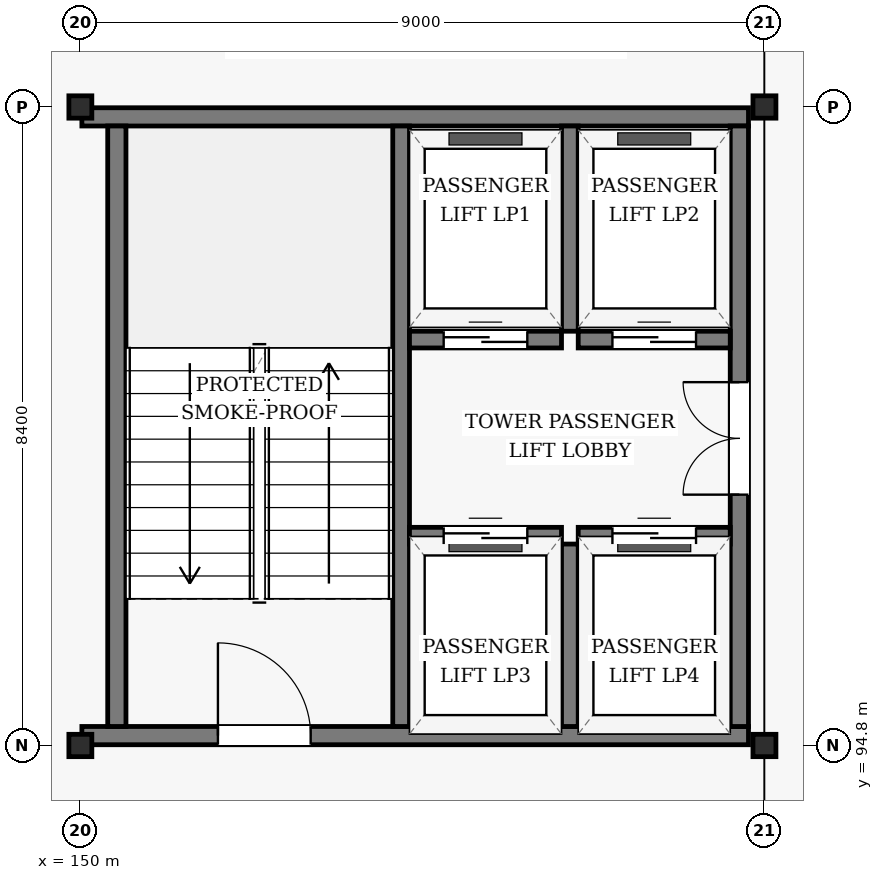
"""IFC4 building model, lengths in metres.
Left out: names, types, materials, properties, quantities, classifications, styles, units other than length and angle.
Written with IfcOpenShell. Run it as: python <this file> out.ifc"""

import sys

from ifc_helpers import new_model, si_unit, direction, frame, frame_2d, origin, origin_2d, place, context, subcontext, project, spatial, rectangle, i_section, extrude, element, fill, save


model = new_model("IFC4")
c1 = context("Model", 3, precision=1e-05, world=origin(), true_north=direction((0.0, 1.0)))
c2 = subcontext(c1, "Body", "Model", "MODEL_VIEW")
j1 = project(units=[si_unit("LENGTHUNIT", "METRE"), si_unit("PLANEANGLEUNIT", "RADIAN")], contexts=[c1])
p1 = place(None, origin())
s1 = spatial("IfcSite", under=j1, at=p1, CompositionType="ELEMENT")
p2 = place(p1, origin())
s2 = spatial("IfcBuilding", under=s1, at=p2, CompositionType="ELEMENT")
p3 = place(p2, frame((0.0, 0.0, 57.6)))
s3 = spatial("IfcBuildingStorey", under=s2, at=p3, CompositionType="ELEMENT", Elevation=57.6)
for number, where, z_axis, x_axis in (
    (1, (150.0, 94.8, 0.0), (0.0, 0.0, 1.0), (1.0, 0.0, 0.0)),
    (2, (150.0, 103.2, 0.0), (0.0, 0.0, 1.0), (1.0, 0.0, 0.0)),
    (3, (159.0, 94.8, 0.0), (0.0, 0.0, 1.0), (1.0, 0.0, 0.0)),
    (4, (159.0, 103.2, 0.0), (0.0, 0.0, 1.0), (1.0, 0.0, 0.0)),
):
    element("IfcColumn", number, at=place(p3, frame(where, z_axis=z_axis, x_axis=x_axis)), inside=s3, PredefinedType="COLUMN", context=c2, shape_type="SweptSolid", body=[
        extrude(i_section(OverallWidth=0.302, OverallDepth=0.294, WebThickness=0.012, FlangeThickness=0.012, FilletRadius=0.018, at=origin_2d()), origin(), (0.0, 0.0, 1.0), 3.6),
    ])
p4 = place(p3, frame((150.02, 94.93, 0.0), z_axis=(0.0, 0.0, 1.0), x_axis=(1.0, 0.0, 0.0)))
e5 = element("IfcWall", 5, at=p4, inside=s3, PredefinedType="SHEAR", context=c2, shape_type="SweptSolid", body=[
    extrude(rectangle(XDim=8.77, YDim=0.24, at=frame_2d((4.385, 0.0))), origin(), (0.0, 0.0, 1.0), 3.33),
])
p5 = place(p4, frame((1.79, 0.0, 0.0)))
e6 = element("IfcOpeningElement", 6, at=p5, cuts=e5, PredefinedType="OPENING", context=c2, shape_type="SweptSolid", body=[
    extrude(rectangle(XDim=1.22, YDim=2.18, at=frame_2d((0.61, 1.09))), frame((0.0, 0.13, 0.0), z_axis=(0.0, -1.0, 0.0), x_axis=(1.0, 0.0, 0.0)), (0.0, 0.0, 1.0), 0.26),
])
p6 = place(p3, frame((150.02, 103.07, 0.0), z_axis=(0.0, 0.0, 1.0), x_axis=(1.0, 0.0, 0.0)))
e7 = element("IfcWall", 7, at=p6, inside=s3, PredefinedType="SHEAR", context=c2, shape_type="SweptSolid", body=[
    extrude(rectangle(XDim=8.77, YDim=0.24, at=frame_2d((4.385, 0.0))), origin(), (0.0, 0.0, 1.0), 3.33),
])
p7 = place(p3, frame((150.48, 95.05, 0.0), z_axis=(0.0, 0.0, 1.0), x_axis=(0.0, 1.0, 0.0)))
e8 = element("IfcWall", 8, at=p7, inside=s3, PredefinedType="SHEAR", context=c2, shape_type="SweptSolid", body=[
    extrude(rectangle(XDim=7.9, YDim=0.24, at=frame_2d((3.95, 0.0))), origin(), (0.0, 0.0, 1.0), 3.33),
])
p8 = place(p3, frame((154.22, 95.05, 0.0), z_axis=(0.0, 0.0, 1.0), x_axis=(0.0, 1.0, 0.0)))
e9 = element("IfcWall", 9, at=p8, inside=s3, PredefinedType="SHEAR", context=c2, shape_type="SweptSolid", body=[
    extrude(rectangle(XDim=7.9, YDim=0.22, at=frame_2d((3.95, 0.0))), origin(), (0.0, 0.0, 1.0), 3.33),
])
p9 = place(p3, frame((158.67, 95.05, 0.0), z_axis=(0.0, 0.0, 1.0), x_axis=(0.0, 1.0, 0.0)))
e10 = element("IfcWall", 10, at=p9, inside=s3, PredefinedType="SHEAR", context=c2, shape_type="SweptSolid", body=[
    extrude(rectangle(XDim=7.9, YDim=0.24, at=frame_2d((3.95, 0.0))), origin(), (0.0, 0.0, 1.0), 3.33),
])
p10 = place(p9, frame((3.05, 0.0, 0.0)))
e11 = element("IfcOpeningElement", 11, at=p10, cuts=e10, PredefinedType="OPENING", context=c2, shape_type="SweptSolid", body=[
    extrude(rectangle(XDim=1.48, YDim=2.22, at=frame_2d((0.74, 1.11))), frame((0.0, 0.13, 0.0), z_axis=(0.0, -1.0, 0.0), x_axis=(1.0, 0.0, 0.0)), (0.0, 0.0, 1.0), 0.26),
])
p11 = place(p3, frame((156.44, 100.25, 0.0), z_axis=(0.0, 0.0, 1.0), x_axis=(0.0, 1.0, 0.0)))
e12 = element("IfcWall", 12, at=p11, inside=s3, PredefinedType="SHEAR", context=c2, shape_type="SweptSolid", body=[
    extrude(rectangle(XDim=2.7, YDim=0.22, at=frame_2d((1.35, 0.0))), origin(), (0.0, 0.0, 1.0), 3.33),
])
p12 = place(p3, frame((154.33, 100.14, 0.0), z_axis=(0.0, 0.0, 1.0), x_axis=(1.0, 0.0, 0.0)))
e13 = element("IfcWall", 13, at=p12, inside=s3, PredefinedType="SHEAR", context=c2, shape_type="SweptSolid", body=[
    extrude(rectangle(XDim=2.0, YDim=0.22, at=frame_2d((1.0, 0.0))), origin(), (0.0, 0.0, 1.0), 3.33),
])
p13 = place(p12, frame((0.45, 0.0, 0.0)))
e14 = element("IfcOpeningElement", 14, at=p13, cuts=e13, PredefinedType="OPENING", context=c2, shape_type="SweptSolid", body=[
    extrude(rectangle(XDim=1.1, YDim=2.15, at=frame_2d((0.55, 1.075))), frame((0.0, 0.12, 0.0), z_axis=(0.0, -1.0, 0.0), x_axis=(1.0, 0.0, 0.0)), (0.0, 0.0, 1.0), 0.24),
])
p14 = place(p3, frame((156.55, 100.14, 0.0), z_axis=(0.0, 0.0, 1.0), x_axis=(1.0, 0.0, 0.0)))
e15 = element("IfcWall", 15, at=p14, inside=s3, PredefinedType="SHEAR", context=c2, shape_type="SweptSolid", body=[
    extrude(rectangle(XDim=2.0, YDim=0.22, at=frame_2d((1.0, 0.0))), origin(), (0.0, 0.0, 1.0), 3.33),
])
p15 = place(p14, frame((0.45, 0.0, 0.0)))
e16 = element("IfcOpeningElement", 16, at=p15, cuts=e15, PredefinedType="OPENING", context=c2, shape_type="SweptSolid", body=[
    extrude(rectangle(XDim=1.1, YDim=2.15, at=frame_2d((0.55, 1.075))), frame((0.0, 0.12, 0.0), z_axis=(0.0, -1.0, 0.0), x_axis=(1.0, 0.0, 0.0)), (0.0, 0.0, 1.0), 0.24),
])
p16 = place(p3, frame((156.44, 95.05, 0.0), z_axis=(0.0, 0.0, 1.0), x_axis=(0.0, 1.0, 0.0)))
e17 = element("IfcWall", 17, at=p16, inside=s3, PredefinedType="SHEAR", context=c2, shape_type="SweptSolid", body=[
    extrude(rectangle(XDim=2.4, YDim=0.22, at=frame_2d((1.2, 0.0))), origin(), (0.0, 0.0, 1.0), 3.33),
])
p17 = place(p3, frame((154.33, 97.56, 0.0), z_axis=(0.0, 0.0, 1.0), x_axis=(1.0, 0.0, 0.0)))
e18 = element("IfcWall", 18, at=p17, inside=s3, PredefinedType="SHEAR", context=c2, shape_type="SweptSolid", body=[
    extrude(rectangle(XDim=2.0, YDim=0.22, at=frame_2d((1.0, 0.0))), origin(), (0.0, 0.0, 1.0), 3.33),
])
p18 = place(p17, frame((0.45, 0.0, 0.0)))
e19 = element("IfcOpeningElement", 19, at=p18, cuts=e18, PredefinedType="OPENING", context=c2, shape_type="SweptSolid", body=[
    extrude(rectangle(XDim=1.1, YDim=2.15, at=frame_2d((0.55, 1.075))), frame((0.0, 0.12, 0.0), z_axis=(0.0, -1.0, 0.0), x_axis=(1.0, 0.0, 0.0)), (0.0, 0.0, 1.0), 0.24),
])
p19 = place(p3, frame((156.55, 97.56, 0.0), z_axis=(0.0, 0.0, 1.0), x_axis=(1.0, 0.0, 0.0)))
e20 = element("IfcWall", 20, at=p19, inside=s3, PredefinedType="SHEAR", context=c2, shape_type="SweptSolid", body=[
    extrude(rectangle(XDim=2.0, YDim=0.22, at=frame_2d((1.0, 0.0))), origin(), (0.0, 0.0, 1.0), 3.33),
])
p20 = place(p19, frame((0.45, 0.0, 0.0)))
e21 = element("IfcOpeningElement", 21, at=p20, cuts=e20, PredefinedType="OPENING", context=c2, shape_type="SweptSolid", body=[
    extrude(rectangle(XDim=1.1, YDim=2.15, at=frame_2d((0.55, 1.075))), frame((0.0, 0.12, 0.0), z_axis=(0.0, -1.0, 0.0), x_axis=(1.0, 0.0, 0.0)), (0.0, 0.0, 1.0), 0.24),
])
p21 = place(p5, origin())
e22 = element("IfcDoor", 22, at=p21, inside=s3, OperationType="SINGLE_SWING_LEFT", PredefinedType="DOOR", context=c2, shape_type="SweptSolid", body=[
    extrude(rectangle(XDim=1.22, YDim=2.18, at=frame_2d((0.61, 1.09))), frame((0.0, 0.025, 0.0), z_axis=(0.0, -1.0, 0.0), x_axis=(1.0, 0.0, 0.0)), (0.0, 0.0, 1.0), 0.05),
])
fill(e6, e22)
p22 = place(p10, origin())
e23 = element("IfcDoor", 23, at=p22, inside=s3, OperationType="DOUBLE_DOOR_SINGLE_SWING", PredefinedType="DOOR", context=c2, shape_type="SweptSolid", body=[
    extrude(rectangle(XDim=1.48, YDim=2.22, at=frame_2d((0.74, 1.11))), frame((0.0, 0.025, 0.0), z_axis=(0.0, -1.0, 0.0), x_axis=(1.0, 0.0, 0.0)), (0.0, 0.0, 1.0), 0.05),
])
fill(e11, e23)
p23 = place(p13, origin())
e24 = element("IfcDoor", 24, at=p23, inside=s3, OperationType="SLIDING_TO_LEFT", PredefinedType="DOOR", context=c2, shape_type="SweptSolid", body=[
    extrude(rectangle(XDim=1.1, YDim=2.15, at=frame_2d((0.55, 1.075))), frame((0.0, 0.025, 0.0), z_axis=(0.0, -1.0, 0.0), x_axis=(1.0, 0.0, 0.0)), (0.0, 0.0, 1.0), 0.05),
])
fill(e14, e24)
p24 = place(p15, origin())
e25 = element("IfcDoor", 25, at=p24, inside=s3, OperationType="SLIDING_TO_LEFT", PredefinedType="DOOR", context=c2, shape_type="SweptSolid", body=[
    extrude(rectangle(XDim=1.1, YDim=2.15, at=frame_2d((0.55, 1.075))), frame((0.0, 0.025, 0.0), z_axis=(0.0, -1.0, 0.0), x_axis=(1.0, 0.0, 0.0)), (0.0, 0.0, 1.0), 0.05),
])
fill(e16, e25)
p25 = place(p18, origin())
e26 = element("IfcDoor", 26, at=p25, inside=s3, OperationType="SLIDING_TO_LEFT", PredefinedType="DOOR", context=c2, shape_type="SweptSolid", body=[
    extrude(rectangle(XDim=1.1, YDim=2.15, at=frame_2d((0.55, 1.075))), frame((0.0, 0.025, 0.0), z_axis=(0.0, -1.0, 0.0), x_axis=(1.0, 0.0, 0.0)), (0.0, 0.0, 1.0), 0.05),
])
fill(e19, e26)
p26 = place(p20, origin())
e27 = element("IfcDoor", 27, at=p26, inside=s3, OperationType="SLIDING_TO_LEFT", PredefinedType="DOOR", context=c2, shape_type="SweptSolid", body=[
    extrude(rectangle(XDim=1.1, YDim=2.15, at=frame_2d((0.55, 1.075))), frame((0.0, 0.025, 0.0), z_axis=(0.0, -1.0, 0.0), x_axis=(1.0, 0.0, 0.0)), (0.0, 0.0, 1.0), 0.05),
])
fill(e21, e27)
save(model, sys.argv[1])
